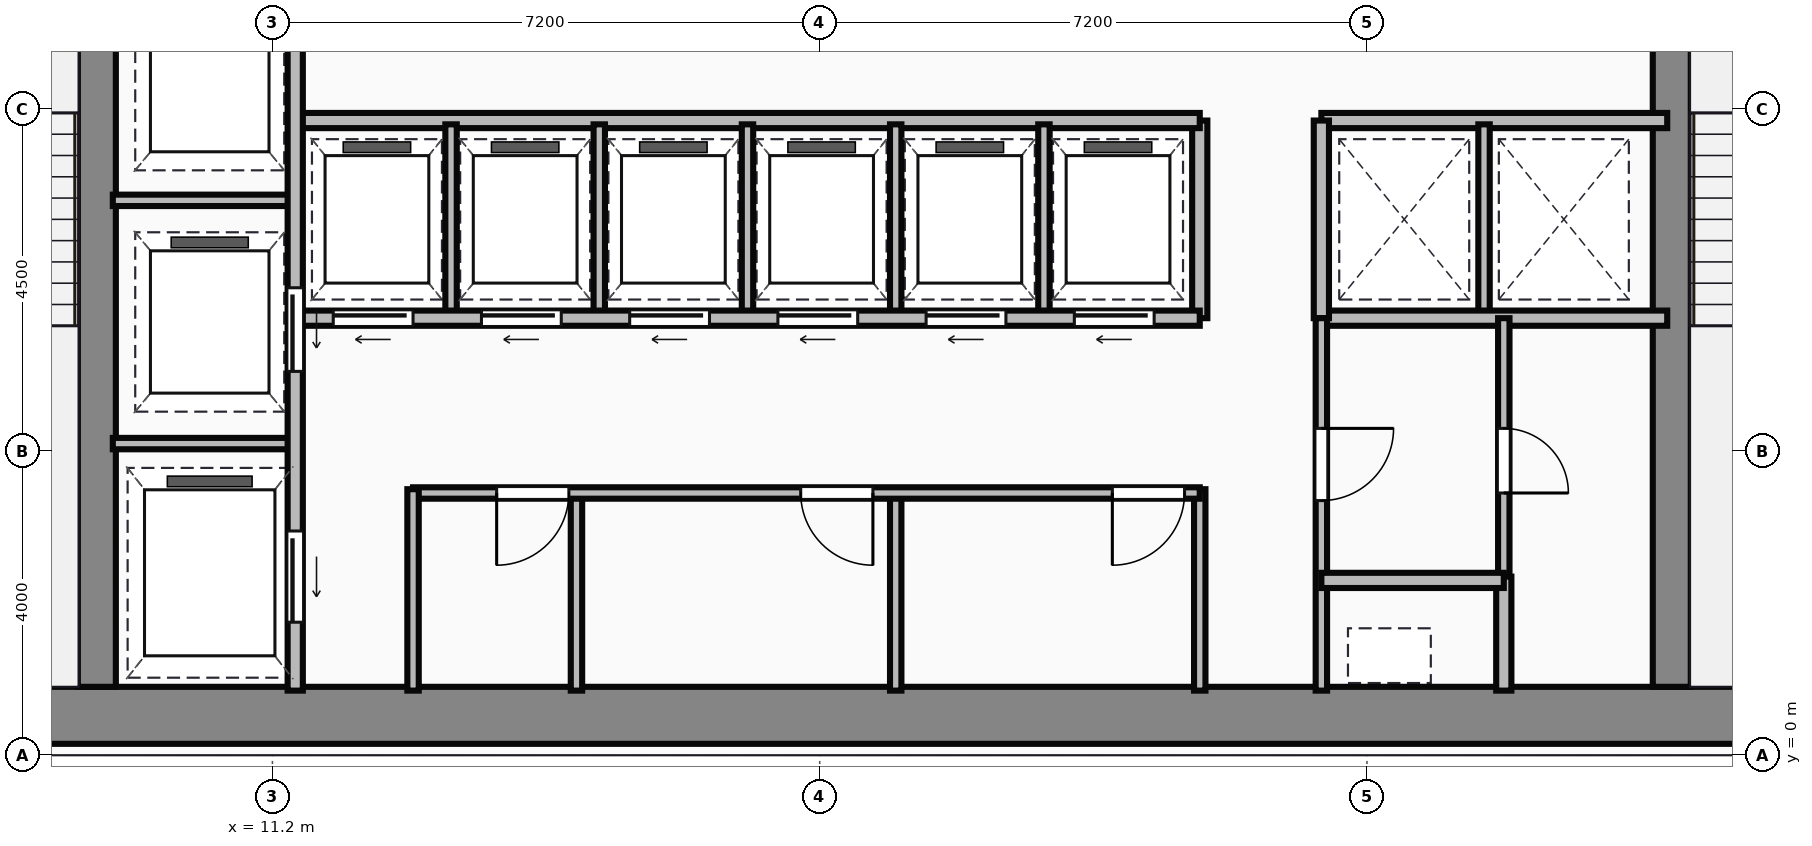
"""IFC4 building model, lengths in metres.
Left out: names, types, materials, properties, quantities, classifications, styles, units other than length and angle.
Written with IfcOpenShell. Run it as: python <this file> out.ifc"""

import sys

from ifc_helpers import new_model, si_unit, direction, frame, frame_2d, origin, place, context, subcontext, project, spatial, rectangle, extrude, source, transform, mapped, element, fill, save


model = new_model("IFC4")
c1 = context("Model", 3, precision=1e-05, world=origin(), true_north=direction((0.0, 1.0)))
c2 = subcontext(c1, "Body", "Model", "MODEL_VIEW")
j1 = project(units=[si_unit("LENGTHUNIT", "METRE"), si_unit("PLANEANGLEUNIT", "RADIAN")], contexts=[c1])
p1 = place(None, origin())
s1 = spatial("IfcSite", under=j1, at=p1, CompositionType="ELEMENT")
p2 = place(p1, origin())
s2 = spatial("IfcBuilding", under=s1, at=p2, CompositionType="ELEMENT")
p3 = place(p2, frame((0.0, 0.0, 162.5)))
s3 = spatial("IfcBuildingStorey", under=s2, at=p3, CompositionType="ELEMENT", Elevation=162.5)
m1 = source(origin(), c2, "Body", "SweptSolid", [
    extrude(rectangle(XDim=29.5, YDim=0.75, at=frame_2d((14.75, 0.0))), origin(), (0.0, 0.0, 1.0), 3.65),
])
p4 = place(p3, frame((4.5, 0.525, 0.0), z_axis=(0.0, 0.0, 1.0), x_axis=(1.0, 0.0, 0.0)))
e1 = element("IfcWall", 1, at=p4, inside=s3, PredefinedType="SHEAR", context=c2, shape_type="MappedRepresentation", body=[
    mapped(m1, transform((0.0, 0.0, 0.0))),
])
m2 = source(origin(), c2, "Body", "SweptSolid", [
    extrude(rectangle(XDim=12.35, YDim=0.5, at=frame_2d((6.175, 0.0))), origin(), (0.0, 0.0, 1.0), 3.65),
])
for number, where, z_axis, x_axis in (
    (2, (8.89, 0.9, 0.0), (0.0, 0.0, 1.0), (0.0, 1.0, 0.0)),
    (3, (29.61, 0.9, 0.0), (0.0, 0.0, 1.0), (0.0, 1.0, 0.0)),
):
    element("IfcWall", number, at=place(p3, frame(where, z_axis=z_axis, x_axis=x_axis)), inside=s3, PredefinedType="SHEAR", context=c2, shape_type="MappedRepresentation", body=[
        mapped(m2, transform((0.0, 0.0, 0.0))),
    ])
m3 = source(origin(), c2, "Body", "SweptSolid", [
    extrude(rectangle(XDim=9.6, YDim=0.2, at=frame_2d((4.8, 0.0))), origin(), (0.0, 0.0, 1.0), 3.4),
])
p5 = place(p3, frame((11.5, 0.85, 0.0), z_axis=(0.0, 0.0, 1.0), x_axis=(0.0, 1.0, 0.0)))
e4 = element("IfcWall", 4, at=p5, inside=s3, PredefinedType="PARTITIONING", context=c2, shape_type="MappedRepresentation", body=[
    mapped(m3, transform((0.0, 0.0, 0.0))),
])
p6 = place(p5, frame((4.2, 0.0, 0.0)))
e5 = element("IfcOpeningElement", 5, at=p6, cuts=e4, PredefinedType="OPENING", context=c2, shape_type="SweptSolid", body=[
    extrude(rectangle(XDim=1.1, YDim=2.15, at=frame_2d((0.55, 1.075))), frame((0.0, 0.11, 0.0), z_axis=(0.0, -1.0, 0.0), x_axis=(1.0, 0.0, 0.0)), (0.0, 0.0, 1.0), 0.22),
])
p7 = place(p5, frame((0.9, 0.0, 0.0)))
e6 = element("IfcOpeningElement", 6, at=p7, cuts=e4, PredefinedType="OPENING", context=c2, shape_type="SweptSolid", body=[
    extrude(rectangle(XDim=1.2, YDim=2.15, at=frame_2d((0.6, 1.075))), frame((0.0, 0.11, 0.0), z_axis=(0.0, -1.0, 0.0), x_axis=(1.0, 0.0, 0.0)), (0.0, 0.0, 1.0), 0.22),
])
m4 = source(origin(), c2, "Body", "SweptSolid", [
    extrude(rectangle(XDim=2.4, YDim=0.15, at=frame_2d((1.2, 0.0))), origin(), (0.0, 0.0, 1.0), 3.4),
])
for number, where, z_axis, x_axis in (
    (7, (9.1, 4.1, 0.0), (0.0, 0.0, 1.0), (1.0, 0.0, 0.0)),
    (8, (9.1, 7.3, 0.0), (0.0, 0.0, 1.0), (1.0, 0.0, 0.0)),
):
    element("IfcWall", number, at=place(p3, frame(where, z_axis=z_axis, x_axis=x_axis)), inside=s3, PredefinedType="PARTITIONING", context=c2, shape_type="MappedRepresentation", body=[
        mapped(m4, transform((0.0, 0.0, 0.0))),
    ])
m5 = source(origin(), c2, "Body", "SweptSolid", [
    extrude(rectangle(XDim=2.65, YDim=0.15, at=frame_2d((1.325, 0.0))), origin(), (0.0, 0.0, 1.0), 3.4),
])
p8 = place(p3, frame((13.05, 0.85, 0.0), z_axis=(0.0, 0.0, 1.0), x_axis=(0.0, 1.0, 0.0)))
e9 = element("IfcWall", 9, at=p8, inside=s3, PredefinedType="PARTITIONING", context=c2, shape_type="MappedRepresentation", body=[
    mapped(m5, transform((0.0, 0.0, 0.0))),
])
m6 = source(origin(), c2, "Body", "SweptSolid", [
    extrude(rectangle(XDim=10.35, YDim=0.15, at=frame_2d((5.175, 0.0))), origin(), (0.0, 0.0, 1.0), 3.4),
])
p9 = place(p3, frame((13.05, 3.45, 0.0), z_axis=(0.0, 0.0, 1.0), x_axis=(1.0, 0.0, 0.0)))
e10 = element("IfcWall", 10, at=p9, inside=s3, PredefinedType="PARTITIONING", context=c2, shape_type="MappedRepresentation", body=[
    mapped(m6, transform((0.0, 0.0, 0.0))),
])
p10 = place(p9, frame((1.1, 0.0, 0.0)))
e11 = element("IfcOpeningElement", 11, at=p10, cuts=e10, PredefinedType="OPENING", context=c2, shape_type="SweptSolid", body=[
    extrude(rectangle(XDim=0.95, YDim=2.15, at=frame_2d((0.475, 1.075))), frame((0.0, 0.085, 0.0), z_axis=(0.0, -1.0, 0.0), x_axis=(1.0, 0.0, 0.0)), (0.0, 0.0, 1.0), 0.17),
])
p11 = place(p9, frame((5.1, 0.0, 0.0)))
e12 = element("IfcOpeningElement", 12, at=p11, cuts=e10, PredefinedType="OPENING", context=c2, shape_type="SweptSolid", body=[
    extrude(rectangle(XDim=0.95, YDim=2.15, at=frame_2d((0.475, 1.075))), frame((0.0, 0.085, 0.0), z_axis=(0.0, -1.0, 0.0), x_axis=(1.0, 0.0, 0.0)), (0.0, 0.0, 1.0), 0.17),
])
p12 = place(p9, frame((9.2, 0.0, 0.0)))
e13 = element("IfcOpeningElement", 13, at=p12, cuts=e10, PredefinedType="OPENING", context=c2, shape_type="SweptSolid", body=[
    extrude(rectangle(XDim=0.95, YDim=2.15, at=frame_2d((0.475, 1.075))), frame((0.0, 0.085, 0.0), z_axis=(0.0, -1.0, 0.0), x_axis=(1.0, 0.0, 0.0)), (0.0, 0.0, 1.0), 0.17),
])
p13 = place(p3, frame((23.4, 0.85, 0.0), z_axis=(0.0, 0.0, 1.0), x_axis=(0.0, 1.0, 0.0)))
e14 = element("IfcWall", 14, at=p13, inside=s3, PredefinedType="PARTITIONING", context=c2, shape_type="MappedRepresentation", body=[
    mapped(m5, transform((0.0, 0.0, 0.0))),
])
m7 = source(origin(), c2, "Body", "SweptSolid", [
    extrude(rectangle(XDim=2.6, YDim=0.15, at=frame_2d((1.3, 0.0))), origin(), (0.0, 0.0, 1.0), 3.4),
])
for number, where, z_axis, x_axis in (
    (15, (15.2, 0.85, 0.0), (0.0, 0.0, 1.0), (0.0, 1.0, 0.0)),
    (16, (19.4, 0.85, 0.0), (0.0, 0.0, 1.0), (0.0, 1.0, 0.0)),
):
    element("IfcWall", number, at=place(p3, frame(where, z_axis=z_axis, x_axis=x_axis)), inside=s3, PredefinedType="PARTITIONING", context=c2, shape_type="MappedRepresentation", body=[
        mapped(m7, transform((0.0, 0.0, 0.0))),
    ])
m8 = source(origin(), c2, "Body", "SweptSolid", [
    extrude(rectangle(XDim=11.85, YDim=0.2, at=frame_2d((5.925, 0.0))), origin(), (0.0, 0.0, 1.0), 3.4),
])
p14 = place(p3, frame((11.55, 5.75, 0.0), z_axis=(0.0, 0.0, 1.0), x_axis=(1.0, 0.0, 0.0)))
e17 = element("IfcWall", 17, at=p14, inside=s3, PredefinedType="PARTITIONING", context=c2, shape_type="MappedRepresentation", body=[
    mapped(m8, transform((0.0, 0.0, 0.0))),
])
p15 = place(p14, frame((0.45, 0.0, 0.0)))
e18 = element("IfcOpeningElement", 18, at=p15, cuts=e17, PredefinedType="OPENING", context=c2, shape_type="SweptSolid", body=[
    extrude(rectangle(XDim=1.05, YDim=2.15, at=frame_2d((0.525, 1.075))), frame((0.0, 0.11, 0.0), z_axis=(0.0, -1.0, 0.0), x_axis=(1.0, 0.0, 0.0)), (0.0, 0.0, 1.0), 0.22),
])
p16 = place(p14, frame((2.4, 0.0, 0.0)))
e19 = element("IfcOpeningElement", 19, at=p16, cuts=e17, PredefinedType="OPENING", context=c2, shape_type="SweptSolid", body=[
    extrude(rectangle(XDim=1.05, YDim=2.15, at=frame_2d((0.525, 1.075))), frame((0.0, 0.11, 0.0), z_axis=(0.0, -1.0, 0.0), x_axis=(1.0, 0.0, 0.0)), (0.0, 0.0, 1.0), 0.22),
])
p17 = place(p14, frame((4.35, 0.0, 0.0)))
e20 = element("IfcOpeningElement", 20, at=p17, cuts=e17, PredefinedType="OPENING", context=c2, shape_type="SweptSolid", body=[
    extrude(rectangle(XDim=1.05, YDim=2.15, at=frame_2d((0.525, 1.075))), frame((0.0, 0.11, 0.0), z_axis=(0.0, -1.0, 0.0), x_axis=(1.0, 0.0, 0.0)), (0.0, 0.0, 1.0), 0.22),
])
p18 = place(p14, frame((6.3, 0.0, 0.0)))
e21 = element("IfcOpeningElement", 21, at=p18, cuts=e17, PredefinedType="OPENING", context=c2, shape_type="SweptSolid", body=[
    extrude(rectangle(XDim=1.05, YDim=2.15, at=frame_2d((0.525, 1.075))), frame((0.0, 0.11, 0.0), z_axis=(0.0, -1.0, 0.0), x_axis=(1.0, 0.0, 0.0)), (0.0, 0.0, 1.0), 0.22),
])
p19 = place(p14, frame((8.25, 0.0, 0.0)))
e22 = element("IfcOpeningElement", 22, at=p19, cuts=e17, PredefinedType="OPENING", context=c2, shape_type="SweptSolid", body=[
    extrude(rectangle(XDim=1.05, YDim=2.15, at=frame_2d((0.525, 1.075))), frame((0.0, 0.11, 0.0), z_axis=(0.0, -1.0, 0.0), x_axis=(1.0, 0.0, 0.0)), (0.0, 0.0, 1.0), 0.22),
])
p20 = place(p14, frame((10.2, 0.0, 0.0)))
e23 = element("IfcOpeningElement", 23, at=p20, cuts=e17, PredefinedType="OPENING", context=c2, shape_type="SweptSolid", body=[
    extrude(rectangle(XDim=1.05, YDim=2.15, at=frame_2d((0.525, 1.075))), frame((0.0, 0.11, 0.0), z_axis=(0.0, -1.0, 0.0), x_axis=(1.0, 0.0, 0.0)), (0.0, 0.0, 1.0), 0.22),
])
p21 = place(p3, frame((11.55, 8.35, 0.0), z_axis=(0.0, 0.0, 1.0), x_axis=(1.0, 0.0, 0.0)))
e24 = element("IfcWall", 24, at=p21, inside=s3, PredefinedType="PARTITIONING", context=c2, shape_type="MappedRepresentation", body=[
    mapped(m8, transform((0.0, 0.0, 0.0))),
])
m9 = source(origin(), c2, "Body", "SweptSolid", [
    extrude(rectangle(XDim=2.6, YDim=0.2, at=frame_2d((1.3, 0.0))), origin(), (0.0, 0.0, 1.0), 3.4),
])
p22 = place(p3, frame((23.4, 5.75, 0.0), z_axis=(0.0, 0.0, 1.0), x_axis=(0.0, 1.0, 0.0)))
e25 = element("IfcWall", 25, at=p22, inside=s3, PredefinedType="PARTITIONING", context=c2, shape_type="MappedRepresentation", body=[
    mapped(m9, transform((0.0, 0.0, 0.0))),
])
m10 = source(origin(), c2, "Body", "SweptSolid", [
    extrude(rectangle(XDim=2.5, YDim=0.15, at=frame_2d((1.25, 0.0))), origin(), (0.0, 0.0, 1.0), 3.4),
])
for number, where, z_axis, x_axis in (
    (26, (13.55, 5.8, 0.0), (0.0, 0.0, 1.0), (0.0, 1.0, 0.0)),
    (27, (15.5, 5.8, 0.0), (0.0, 0.0, 1.0), (0.0, 1.0, 0.0)),
    (28, (17.45, 5.8, 0.0), (0.0, 0.0, 1.0), (0.0, 1.0, 0.0)),
    (29, (19.4, 5.8, 0.0), (0.0, 0.0, 1.0), (0.0, 1.0, 0.0)),
    (30, (21.35, 5.8, 0.0), (0.0, 0.0, 1.0), (0.0, 1.0, 0.0)),
):
    element("IfcWall", number, at=place(p3, frame(where, z_axis=z_axis, x_axis=x_axis)), inside=s3, PredefinedType="PARTITIONING", context=c2, shape_type="MappedRepresentation", body=[
        mapped(m10, transform((0.0, 0.0, 0.0))),
    ])
m11 = source(origin(), c2, "Body", "SweptSolid", [
    extrude(rectangle(XDim=4.55, YDim=0.2, at=frame_2d((2.275, 0.0))), origin(), (0.0, 0.0, 1.0), 3.4),
])
for number, where, z_axis, x_axis in (
    (31, (25.0, 8.35, 0.0), (0.0, 0.0, 1.0), (1.0, 0.0, 0.0)),
    (32, (25.0, 5.75, 0.0), (0.0, 0.0, 1.0), (1.0, 0.0, 0.0)),
):
    element("IfcWall", number, at=place(p3, frame(where, z_axis=z_axis, x_axis=x_axis)), inside=s3, PredefinedType="PARTITIONING", context=c2, shape_type="MappedRepresentation", body=[
        mapped(m11, transform((0.0, 0.0, 0.0))),
    ])
p23 = place(p3, frame((25.0, 5.75, 0.0), z_axis=(0.0, 0.0, 1.0), x_axis=(0.0, 1.0, 0.0)))
e33 = element("IfcWall", 33, at=p23, inside=s3, PredefinedType="PARTITIONING", context=c2, shape_type="MappedRepresentation", body=[
    mapped(m9, transform((0.0, 0.0, 0.0))),
])
p24 = place(p3, frame((27.14, 5.8, 0.0), z_axis=(0.0, 0.0, 1.0), x_axis=(0.0, 1.0, 0.0)))
e34 = element("IfcWall", 34, at=p24, inside=s3, PredefinedType="PARTITIONING", context=c2, shape_type="MappedRepresentation", body=[
    mapped(m10, transform((0.0, 0.0, 0.0))),
])
m12 = source(origin(), c2, "Body", "SweptSolid", [
    extrude(rectangle(XDim=4.9, YDim=0.15, at=frame_2d((2.45, 0.0))), origin(), (0.0, 0.0, 1.0), 3.4),
])
p25 = place(p3, frame((25.0, 0.85, 0.0), z_axis=(0.0, 0.0, 1.0), x_axis=(0.0, 1.0, 0.0)))
e35 = element("IfcWall", 35, at=p25, inside=s3, PredefinedType="PARTITIONING", context=c2, shape_type="MappedRepresentation", body=[
    mapped(m12, transform((0.0, 0.0, 0.0))),
])
p26 = place(p25, frame((2.5, 0.0, 0.0)))
e36 = element("IfcOpeningElement", 36, at=p26, cuts=e35, PredefinedType="OPENING", context=c2, shape_type="SweptSolid", body=[
    extrude(rectangle(XDim=0.95, YDim=2.15, at=frame_2d((0.475, 1.075))), frame((0.0, 0.085, 0.0), z_axis=(0.0, -1.0, 0.0), x_axis=(1.0, 0.0, 0.0)), (0.0, 0.0, 1.0), 0.17),
])
m13 = source(origin(), c2, "Body", "SweptSolid", [
    extrude(rectangle(XDim=2.4, YDim=0.2, at=frame_2d((1.2, 0.0))), origin(), (0.0, 0.0, 1.0), 3.4),
])
p27 = place(p3, frame((25.0, 2.3, 0.0), z_axis=(0.0, 0.0, 1.0), x_axis=(1.0, 0.0, 0.0)))
e37 = element("IfcWall", 37, at=p27, inside=s3, PredefinedType="PARTITIONING", context=c2, shape_type="MappedRepresentation", body=[
    mapped(m13, transform((0.0, 0.0, 0.0))),
])
m14 = source(origin(), c2, "Body", "SweptSolid", [
    extrude(rectangle(XDim=1.5, YDim=0.2, at=frame_2d((0.75, 0.0))), origin(), (0.0, 0.0, 1.0), 3.4),
])
p28 = place(p3, frame((27.4, 0.85, 0.0), z_axis=(0.0, 0.0, 1.0), x_axis=(0.0, 1.0, 0.0)))
e38 = element("IfcWall", 38, at=p28, inside=s3, PredefinedType="PARTITIONING", context=c2, shape_type="MappedRepresentation", body=[
    mapped(m14, transform((0.0, 0.0, 0.0))),
])
m15 = source(origin(), c2, "Body", "SweptSolid", [
    extrude(rectangle(XDim=3.4, YDim=0.15, at=frame_2d((1.7, 0.0))), origin(), (0.0, 0.0, 1.0), 3.4),
])
p29 = place(p3, frame((27.4, 2.35, 0.0), z_axis=(0.0, 0.0, 1.0), x_axis=(0.0, 1.0, 0.0)))
e39 = element("IfcWall", 39, at=p29, inside=s3, PredefinedType="PARTITIONING", context=c2, shape_type="MappedRepresentation", body=[
    mapped(m15, transform((0.0, 0.0, 0.0))),
])
p30 = place(p29, frame((1.1, 0.0, 0.0)))
e40 = element("IfcOpeningElement", 40, at=p30, cuts=e39, PredefinedType="OPENING", context=c2, shape_type="SweptSolid", body=[
    extrude(rectangle(XDim=0.85, YDim=2.1, at=frame_2d((0.425, 1.05))), frame((0.0, 0.085, 0.0), z_axis=(0.0, -1.0, 0.0), x_axis=(1.0, 0.0, 0.0)), (0.0, 0.0, 1.0), 0.17),
])
m16 = source(origin(), c2, "Body", "SweptSolid", [
    extrude(rectangle(XDim=1.1, YDim=2.15, at=frame_2d((0.55, 1.075))), frame((0.0, 0.025, 0.0), z_axis=(0.0, -1.0, 0.0), x_axis=(1.0, 0.0, 0.0)), (0.0, 0.0, 1.0), 0.05),
])
p31 = place(p6, frame((1.1, 0.0, 0.0), z_axis=(0.0, 0.0, 1.0), x_axis=(-1.0, 0.0, 0.0)))
e41 = element("IfcDoor", 41, at=p31, inside=s3, OperationType="SLIDING_TO_LEFT", PredefinedType="DOOR", context=c2, shape_type="MappedRepresentation", body=[
    mapped(m16, transform((0.0, 0.0, 0.0))),
])
fill(e5, e41)
m17 = source(origin(), c2, "Body", "SweptSolid", [
    extrude(rectangle(XDim=1.2, YDim=2.15, at=frame_2d((0.6, 1.075))), frame((0.0, 0.025, 0.0), z_axis=(0.0, -1.0, 0.0), x_axis=(1.0, 0.0, 0.0)), (0.0, 0.0, 1.0), 0.05),
])
p32 = place(p7, frame((1.2, 0.0, 0.0), z_axis=(0.0, 0.0, 1.0), x_axis=(-1.0, 0.0, 0.0)))
e42 = element("IfcDoor", 42, at=p32, inside=s3, OperationType="SLIDING_TO_LEFT", PredefinedType="DOOR", context=c2, shape_type="MappedRepresentation", body=[
    mapped(m17, transform((0.0, 0.0, 0.0))),
])
fill(e6, e42)
m18 = source(origin(), c2, "Body", "SweptSolid", [
    extrude(rectangle(XDim=0.95, YDim=2.15, at=frame_2d((0.475, 1.075))), frame((0.0, 0.025, 0.0), z_axis=(0.0, -1.0, 0.0), x_axis=(1.0, 0.0, 0.0)), (0.0, 0.0, 1.0), 0.05),
])
p33 = place(p10, origin())
e43 = element("IfcDoor", 43, at=p33, inside=s3, OperationType="SINGLE_SWING_LEFT", PredefinedType="DOOR", context=c2, shape_type="MappedRepresentation", body=[
    mapped(m18, transform((0.0, 0.0, 0.0))),
])
fill(e11, e43)
p34 = place(p11, origin())
e44 = element("IfcDoor", 44, at=p34, inside=s3, OperationType="SINGLE_SWING_RIGHT", PredefinedType="DOOR", context=c2, shape_type="MappedRepresentation", body=[
    mapped(m18, transform((0.0, 0.0, 0.0))),
])
fill(e12, e44)
p35 = place(p12, origin())
e45 = element("IfcDoor", 45, at=p35, inside=s3, OperationType="SINGLE_SWING_LEFT", PredefinedType="DOOR", context=c2, shape_type="MappedRepresentation", body=[
    mapped(m18, transform((0.0, 0.0, 0.0))),
])
fill(e13, e45)
m19 = source(origin(), c2, "Body", "SweptSolid", [
    extrude(rectangle(XDim=1.05, YDim=2.15, at=frame_2d((0.525, 1.075))), frame((0.0, 0.025, 0.0), z_axis=(0.0, -1.0, 0.0), x_axis=(1.0, 0.0, 0.0)), (0.0, 0.0, 1.0), 0.05),
])
p36 = place(p15, frame((1.05, 0.0, 0.0), z_axis=(0.0, 0.0, 1.0), x_axis=(-1.0, 0.0, 0.0)))
e46 = element("IfcDoor", 46, at=p36, inside=s3, OperationType="SLIDING_TO_LEFT", PredefinedType="DOOR", context=c2, shape_type="MappedRepresentation", body=[
    mapped(m19, transform((0.0, 0.0, 0.0))),
])
fill(e18, e46)
p37 = place(p16, frame((1.05, 0.0, 0.0), z_axis=(0.0, 0.0, 1.0), x_axis=(-1.0, 0.0, 0.0)))
e47 = element("IfcDoor", 47, at=p37, inside=s3, OperationType="SLIDING_TO_LEFT", PredefinedType="DOOR", context=c2, shape_type="MappedRepresentation", body=[
    mapped(m19, transform((0.0, 0.0, 0.0))),
])
fill(e19, e47)
p38 = place(p17, frame((1.05, 0.0, 0.0), z_axis=(0.0, 0.0, 1.0), x_axis=(-1.0, 0.0, 0.0)))
e48 = element("IfcDoor", 48, at=p38, inside=s3, OperationType="SLIDING_TO_LEFT", PredefinedType="DOOR", context=c2, shape_type="MappedRepresentation", body=[
    mapped(m19, transform((0.0, 0.0, 0.0))),
])
fill(e20, e48)
p39 = place(p18, frame((1.05, 0.0, 0.0), z_axis=(0.0, 0.0, 1.0), x_axis=(-1.0, 0.0, 0.0)))
e49 = element("IfcDoor", 49, at=p39, inside=s3, OperationType="SLIDING_TO_LEFT", PredefinedType="DOOR", context=c2, shape_type="MappedRepresentation", body=[
    mapped(m19, transform((0.0, 0.0, 0.0))),
])
fill(e21, e49)
p40 = place(p19, frame((1.05, 0.0, 0.0), z_axis=(0.0, 0.0, 1.0), x_axis=(-1.0, 0.0, 0.0)))
e50 = element("IfcDoor", 50, at=p40, inside=s3, OperationType="SLIDING_TO_LEFT", PredefinedType="DOOR", context=c2, shape_type="MappedRepresentation", body=[
    mapped(m19, transform((0.0, 0.0, 0.0))),
])
fill(e22, e50)
p41 = place(p20, frame((1.05, 0.0, 0.0), z_axis=(0.0, 0.0, 1.0), x_axis=(-1.0, 0.0, 0.0)))
e51 = element("IfcDoor", 51, at=p41, inside=s3, OperationType="SLIDING_TO_LEFT", PredefinedType="DOOR", context=c2, shape_type="MappedRepresentation", body=[
    mapped(m19, transform((0.0, 0.0, 0.0))),
])
fill(e23, e51)
p42 = place(p26, origin())
e52 = element("IfcDoor", 52, at=p42, inside=s3, OperationType="SINGLE_SWING_RIGHT", PredefinedType="DOOR", context=c2, shape_type="MappedRepresentation", body=[
    mapped(m18, transform((0.0, 0.0, 0.0))),
])
fill(e36, e52)
m20 = source(origin(), c2, "Body", "SweptSolid", [
    extrude(rectangle(XDim=0.85, YDim=2.1, at=frame_2d((0.425, 1.05))), frame((0.0, 0.025, 0.0), z_axis=(0.0, -1.0, 0.0), x_axis=(1.0, 0.0, 0.0)), (0.0, 0.0, 1.0), 0.05),
])
p43 = place(p30, frame((0.85, 0.0, 0.0), z_axis=(0.0, 0.0, 1.0), x_axis=(-1.0, 0.0, 0.0)))
e53 = element("IfcDoor", 53, at=p43, inside=s3, OperationType="SINGLE_SWING_LEFT", PredefinedType="DOOR", context=c2, shape_type="MappedRepresentation", body=[
    mapped(m20, transform((0.0, 0.0, 0.0))),
])
fill(e40, e53)
save(model, sys.argv[1])
